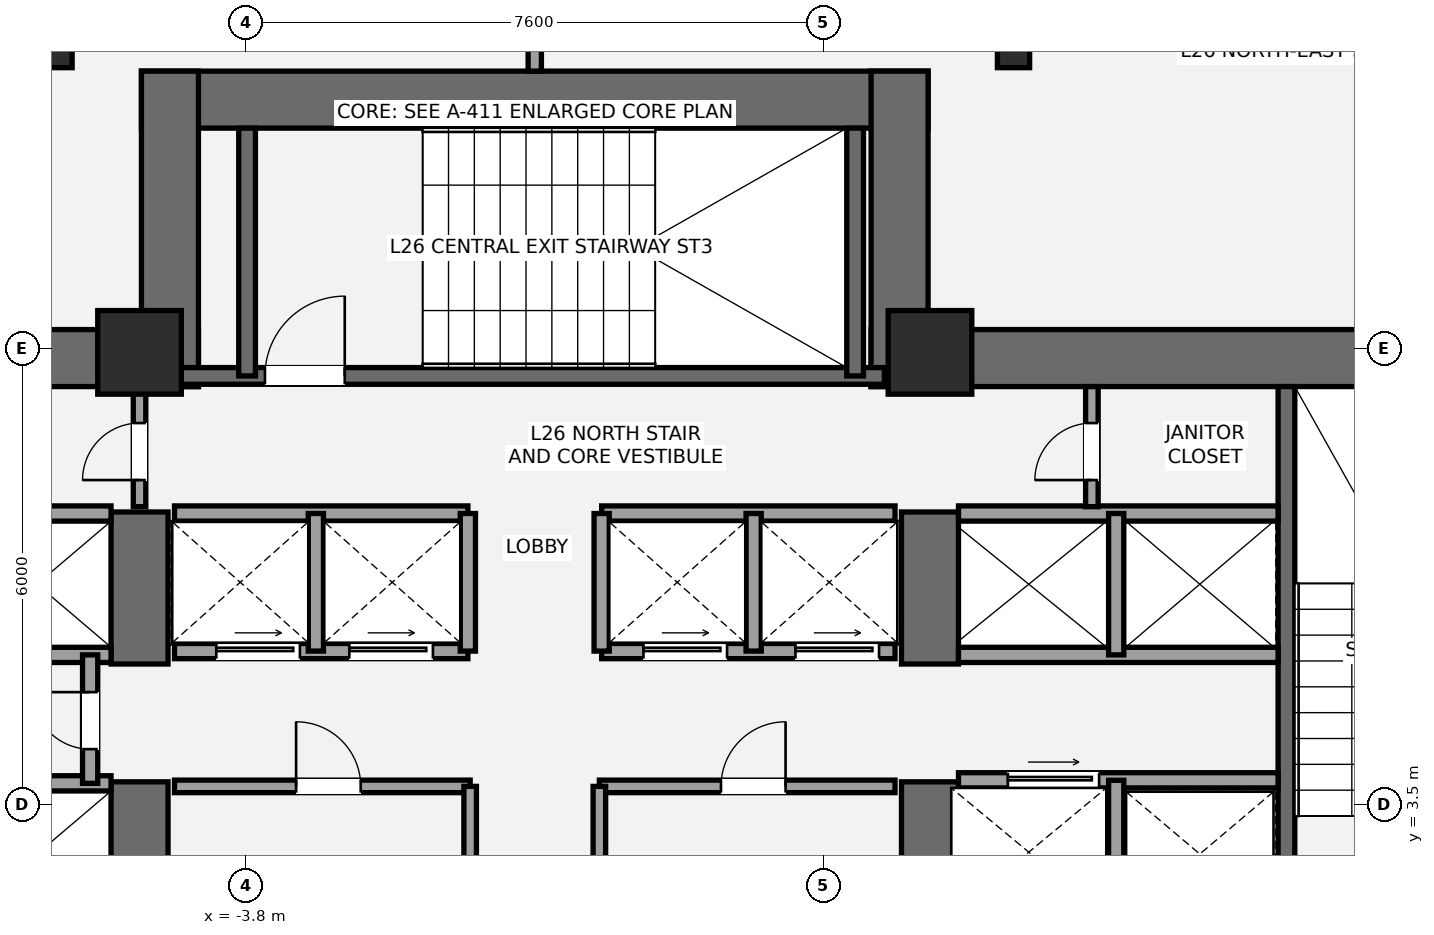
"""IFC4 building model, lengths in metres.
Left out: names, types, materials, properties, quantities, classifications, styles, units other than length and angle.
Written with IfcOpenShell. Run it as: python <this file> out.ifc"""

import sys

from ifc_helpers import new_model, si_unit, direction, frame, frame_2d, origin, origin_2d, place, context, subcontext, project, spatial, rectangle, i_section, extrude, element, fill, save


model = new_model("IFC4")
c1 = context("Model", 3, precision=1e-05, world=origin(), true_north=direction((0.0, 1.0)))
c2 = subcontext(c1, "Body", "Model", "MODEL_VIEW")
j1 = project(units=[si_unit("LENGTHUNIT", "METRE"), si_unit("PLANEANGLEUNIT", "RADIAN")], contexts=[c1])
p1 = place(None, origin())
s1 = spatial("IfcSite", under=j1, at=p1, CompositionType="ELEMENT")
p2 = place(p1, origin())
s2 = spatial("IfcBuilding", under=s1, at=p2, CompositionType="ELEMENT")
p3 = place(p2, frame((0.0, 0.0, 100.1)))
s3 = spatial("IfcBuildingStorey", under=s2, at=p3, CompositionType="ELEMENT", Elevation=100.1)
p4 = place(p3, frame((-13.9, 9.375, 0.0), z_axis=(0.0, 0.0, 1.0), x_axis=(1.0, 0.0, 0.0)))
e1 = element("IfcWall", 1, at=p4, inside=s3, PredefinedType="SHEAR", context=c2, shape_type="SweptSolid", body=[
    extrude(rectangle(XDim=9.475, YDim=0.75, at=frame_2d((4.737, 0.0))), origin(), (0.0, 0.0, 1.0), 3.5),
])
p5 = place(p3, frame((-5.2, 1.1, 0.0), z_axis=(0.0, 0.0, 1.0), x_axis=(0.0, 1.0, 0.0)))
e2 = element("IfcWall", 2, at=p5, inside=s3, PredefinedType="SHEAR", context=c2, shape_type="SweptSolid", body=[
    extrude(rectangle(XDim=2.7, YDim=0.75, at=frame_2d((1.35, 0.0))), origin(), (0.0, 0.0, 1.0), 3.5),
])
p6 = place(p3, frame((-5.2, 5.35, 0.0), z_axis=(0.0, 0.0, 1.0), x_axis=(0.0, 1.0, 0.0)))
e3 = element("IfcWall", 3, at=p6, inside=s3, PredefinedType="SHEAR", context=c2, shape_type="SweptSolid", body=[
    extrude(rectangle(XDim=2.0, YDim=0.75, at=frame_2d((1.0, 0.0))), origin(), (0.0, 0.0, 1.0), 3.5),
])
p7 = place(p3, frame((4.425, 9.375, 0.0), z_axis=(0.0, 0.0, 1.0), x_axis=(1.0, 0.0, 0.0)))
e4 = element("IfcWall", 4, at=p7, inside=s3, PredefinedType="SHEAR", context=c2, shape_type="SweptSolid", body=[
    extrude(rectangle(XDim=9.475, YDim=0.75, at=frame_2d((4.737, 0.0))), origin(), (0.0, 0.0, 1.0), 3.5),
])
p8 = place(p3, frame((5.2, 1.1, 0.0), z_axis=(0.0, 0.0, 1.0), x_axis=(0.0, 1.0, 0.0)))
e5 = element("IfcWall", 5, at=p8, inside=s3, PredefinedType="SHEAR", context=c2, shape_type="SweptSolid", body=[
    extrude(rectangle(XDim=2.7, YDim=0.75, at=frame_2d((1.35, 0.0))), origin(), (0.0, 0.0, 1.0), 3.5),
])
p9 = place(p3, frame((5.2, 5.35, 0.0), z_axis=(0.0, 0.0, 1.0), x_axis=(0.0, 1.0, 0.0)))
e6 = element("IfcWall", 6, at=p9, inside=s3, PredefinedType="SHEAR", context=c2, shape_type="SweptSolid", body=[
    extrude(rectangle(XDim=2.0, YDim=0.75, at=frame_2d((1.0, 0.0))), origin(), (0.0, 0.0, 1.0), 3.5),
])
p10 = place(p3, frame((9.89, 1.85, 0.0), z_axis=(0.0, 0.0, 1.0), x_axis=(0.0, 1.0, 0.0)))
e7 = element("IfcWall", 7, at=p10, inside=s3, PredefinedType="SHEAR", context=c2, shape_type="SweptSolid", body=[
    extrude(rectangle(XDim=7.15, YDim=0.22, at=frame_2d((3.575, 0.0))), origin(), (0.0, 0.0, 1.0), 3.5),
])
p11 = place(p3, frame((-5.175, 12.775, 0.0), z_axis=(0.0, 0.0, 1.0), x_axis=(1.0, 0.0, 0.0)))
e8 = element("IfcWall", 8, at=p11, inside=s3, PredefinedType="SHEAR", context=c2, shape_type="SweptSolid", body=[
    extrude(rectangle(XDim=10.35, YDim=0.75, at=frame_2d((5.175, 0.0))), origin(), (0.0, 0.0, 1.0), 3.5),
])
for number, where, z_axis, x_axis in (
    (9, (-4.8, 9.0, 0.0), (0.0, 0.0, 1.0), (0.0, 1.0, 0.0)),
    (10, (4.8, 9.0, 0.0), (0.0, 0.0, 1.0), (0.0, 1.0, 0.0)),
):
    element("IfcWall", number, at=place(p3, frame(where, z_axis=z_axis, x_axis=x_axis)), inside=s3, PredefinedType="SHEAR", context=c2, shape_type="SweptSolid", body=[
        extrude(rectangle(XDim=4.15, YDim=0.75, at=frame_2d((2.075, 0.0))), origin(), (0.0, 0.0, 1.0), 3.5),
    ])
p12 = place(p3, frame((-4.7, 9.14, 0.0), z_axis=(0.0, 0.0, 1.0), x_axis=(1.0, 0.0, 0.0)))
e11 = element("IfcWall", 11, at=p12, inside=s3, PredefinedType="SHEAR", context=c2, shape_type="SweptSolid", body=[
    extrude(rectangle(XDim=9.3, YDim=0.22, at=frame_2d((4.65, 0.0))), origin(), (0.0, 0.0, 1.0), 3.5),
])
p13 = place(p12, frame((1.15, 0.0, 0.0)))
e12 = element("IfcOpeningElement", 12, at=p13, cuts=e11, PredefinedType="OPENING", context=c2, shape_type="SweptSolid", body=[
    extrude(rectangle(XDim=1.05, YDim=2.15, at=frame_2d((0.525, 1.075))), frame((0.0, 0.12, 0.0), z_axis=(0.0, -1.0, 0.0), x_axis=(1.0, 0.0, 0.0)), (0.0, 0.0, 1.0), 0.24),
])
for number, where, z_axis, x_axis in (
    (13, (-3.785, 9.14, 0.0), (0.0, 0.0, 1.0), (0.0, 1.0, 0.0)),
    (14, (4.215, 9.14, 0.0), (0.0, 0.0, 1.0), (0.0, 1.0, 0.0)),
):
    element("IfcWall", number, at=place(p3, frame(where, z_axis=z_axis, x_axis=x_axis)), inside=s3, PredefinedType="SHEAR", context=c2, shape_type="SweptSolid", body=[
        extrude(rectangle(XDim=3.26, YDim=0.22, at=frame_2d((1.63, 0.0))), origin(), (0.0, 0.0, 1.0), 3.5),
    ])
for number, where, z_axis, x_axis in (
    (15, (-5.2, 9.45, 0.0), (0.0, 0.0, 1.0), (1.0, 0.0, 0.0)),
    (16, (5.2, 9.45, 0.0), (0.0, 0.0, 1.0), (1.0, 0.0, 0.0)),
):
    element("IfcColumn", number, at=place(p3, frame(where, z_axis=z_axis, x_axis=x_axis)), inside=s3, PredefinedType="COLUMN", context=c2, shape_type="SweptSolid", body=[
        extrude(rectangle(XDim=1.1, YDim=1.1, at=origin_2d()), origin(), (0.0, 0.0, 1.0), 3.5),
    ])
for number, where, z_axis, x_axis in (
    (17, (6.299, 13.433, 0.0), (0.0, 0.0, 1.0), (1.0, 0.0, 0.0)),
    (18, (-6.299, 13.433, 0.0), (0.0, 0.0, 1.0), (1.0, 0.0, 0.0)),
):
    element("IfcColumn", number, at=place(p3, frame(where, z_axis=z_axis, x_axis=x_axis)), inside=s3, PredefinedType="COLUMN", context=c2, shape_type="SweptSolid", body=[
        extrude(i_section(OverallWidth=0.424, OverallDepth=0.474, WebThickness=0.048, FlangeThickness=0.077, at=origin_2d()), origin(), (0.0, 0.0, 1.0), 3.5),
    ])
for number, where, z_axis, x_axis in (
    (19, (-9.78, 3.78, 0.0), (0.0, 0.0, 1.0), (1.0, 0.0, 0.0)),
    (20, (-9.78, 5.47, 0.0), (0.0, 0.0, 1.0), (1.0, 0.0, 0.0)),
    (21, (-9.78, 7.33, 0.0), (0.0, 0.0, 1.0), (1.0, 0.0, 0.0)),
):
    element("IfcWall", number, at=place(p3, frame(where, z_axis=z_axis, x_axis=x_axis)), inside=s3, PredefinedType="SOLIDWALL", context=c2, shape_type="SweptSolid", body=[
        extrude(rectangle(XDim=4.205, YDim=0.2, at=frame_2d((2.103, 0.0))), origin(), (0.0, 0.0, 1.0), 3.31),
    ])
p14 = place(p3, frame((-5.85, 3.78, 0.0), z_axis=(0.0, 0.0, 1.0), x_axis=(0.0, 1.0, 0.0)))
e22 = element("IfcWall", 22, at=p14, inside=s3, PredefinedType="SOLIDWALL", context=c2, shape_type="SweptSolid", body=[
    extrude(rectangle(XDim=1.69, YDim=0.2, at=frame_2d((0.845, 0.0))), origin(), (0.0, 0.0, 1.0), 3.31),
])
p15 = place(p14, frame((0.45, 0.0, 0.0)))
e23 = element("IfcOpeningElement", 23, at=p15, cuts=e22, PredefinedType="OPENING", context=c2, shape_type="SweptSolid", body=[
    extrude(rectangle(XDim=0.75, YDim=2.1, at=frame_2d((0.375, 1.05))), frame((0.0, 0.11, 0.0), z_axis=(0.0, -1.0, 0.0), x_axis=(1.0, 0.0, 0.0)), (0.0, 0.0, 1.0), 0.22),
])
p16 = place(p3, frame((5.575, 3.82, 0.0), z_axis=(0.0, 0.0, 1.0), x_axis=(1.0, 0.0, 0.0)))
e24 = element("IfcWall", 24, at=p16, inside=s3, PredefinedType="SOLIDWALL", context=c2, shape_type="SweptSolid", body=[
    extrude(rectangle(XDim=4.205, YDim=0.2, at=frame_2d((2.103, 0.0))), origin(), (0.0, 0.0, 1.0), 3.31),
])
p17 = place(p16, frame((0.65, 0.0, 0.0)))
e25 = element("IfcOpeningElement", 25, at=p17, cuts=e24, PredefinedType="OPENING", context=c2, shape_type="SweptSolid", body=[
    extrude(rectangle(XDim=1.2, YDim=2.2, at=frame_2d((0.6, 1.1))), frame((0.0, 0.11, 0.0), z_axis=(0.0, -1.0, 0.0), x_axis=(1.0, 0.0, 0.0)), (0.0, 0.0, 1.0), 0.22),
])
p18 = place(p3, frame((7.65, 1.85, 0.0), z_axis=(0.0, 0.0, 1.0), x_axis=(0.0, 1.0, 0.0)))
e26 = element("IfcWall", 26, at=p18, inside=s3, PredefinedType="SOLIDWALL", context=c2, shape_type="SweptSolid", body=[
    extrude(rectangle(XDim=1.97, YDim=0.2, at=frame_2d((0.985, 0.0))), origin(), (0.0, 0.0, 1.0), 3.31),
])
for number, where, z_axis, x_axis in (
    (27, (5.575, 5.47, 0.0), (0.0, 0.0, 1.0), (1.0, 0.0, 0.0)),
    (28, (5.575, 7.33, 0.0), (0.0, 0.0, 1.0), (1.0, 0.0, 0.0)),
):
    element("IfcWall", number, at=place(p3, frame(where, z_axis=z_axis, x_axis=x_axis)), inside=s3, PredefinedType="SOLIDWALL", context=c2, shape_type="SweptSolid", body=[
        extrude(rectangle(XDim=4.205, YDim=0.2, at=frame_2d((2.103, 0.0))), origin(), (0.0, 0.0, 1.0), 3.31),
    ])
p19 = place(p3, frame((7.65, 5.47, 0.0), z_axis=(0.0, 0.0, 1.0), x_axis=(0.0, 1.0, 0.0)))
e29 = element("IfcWall", 29, at=p19, inside=s3, PredefinedType="SOLIDWALL", context=c2, shape_type="SweptSolid", body=[
    extrude(rectangle(XDim=1.86, YDim=0.2, at=frame_2d((0.93, 0.0))), origin(), (0.0, 0.0, 1.0), 3.31),
])
p20 = place(p3, frame((-4.74, 3.74, 0.0), z_axis=(0.0, 0.0, 1.0), x_axis=(1.0, 0.0, 0.0)))
e30 = element("IfcWall", 30, at=p20, inside=s3, PredefinedType="PARTITIONING", context=c2, shape_type="SweptSolid", body=[
    extrude(rectangle(XDim=3.89, YDim=0.165, at=frame_2d((1.945, 0.0))), origin(), (0.0, 0.0, 1.0), 3.31),
])
p21 = place(p20, frame((1.6, 0.0, 0.0)))
e31 = element("IfcOpeningElement", 31, at=p21, cuts=e30, PredefinedType="OPENING", context=c2, shape_type="SweptSolid", body=[
    extrude(rectangle(XDim=0.85, YDim=2.1, at=frame_2d((0.425, 1.05))), frame((0.0, 0.093, 0.0), z_axis=(0.0, -1.0, 0.0), x_axis=(1.0, 0.0, 0.0)), (0.0, 0.0, 1.0), 0.185),
])
p22 = place(p3, frame((-0.85, 1.92, 0.0), z_axis=(0.0, 0.0, 1.0), x_axis=(0.0, 1.0, 0.0)))
e32 = element("IfcWall", 32, at=p22, inside=s3, PredefinedType="PARTITIONING", context=c2, shape_type="SweptSolid", body=[
    extrude(rectangle(XDim=1.82, YDim=0.165, at=frame_2d((0.91, 0.0))), origin(), (0.0, 0.0, 1.0), 3.31),
])
p23 = place(p3, frame((0.85, 3.74, 0.0), z_axis=(0.0, 0.0, 1.0), x_axis=(1.0, 0.0, 0.0)))
e33 = element("IfcWall", 33, at=p23, inside=s3, PredefinedType="PARTITIONING", context=c2, shape_type="SweptSolid", body=[
    extrude(rectangle(XDim=3.89, YDim=0.165, at=frame_2d((1.945, 0.0))), origin(), (0.0, 0.0, 1.0), 3.31),
])
p24 = place(p23, frame((1.6, 0.0, 0.0)))
e34 = element("IfcOpeningElement", 34, at=p24, cuts=e33, PredefinedType="OPENING", context=c2, shape_type="SweptSolid", body=[
    extrude(rectangle(XDim=0.85, YDim=2.1, at=frame_2d((0.425, 1.05))), frame((0.0, 0.093, 0.0), z_axis=(0.0, -1.0, 0.0), x_axis=(1.0, 0.0, 0.0)), (0.0, 0.0, 1.0), 0.185),
])
p25 = place(p3, frame((0.85, 1.92, 0.0), z_axis=(0.0, 0.0, 1.0), x_axis=(0.0, 1.0, 0.0)))
e35 = element("IfcWall", 35, at=p25, inside=s3, PredefinedType="PARTITIONING", context=c2, shape_type="SweptSolid", body=[
    extrude(rectangle(XDim=1.82, YDim=0.165, at=frame_2d((0.91, 0.0))), origin(), (0.0, 0.0, 1.0), 3.31),
])
p26 = place(p3, frame((-4.74, 5.52, 0.0), z_axis=(0.0, 0.0, 1.0), x_axis=(1.0, 0.0, 0.0)))
e36 = element("IfcWall", 36, at=p26, inside=s3, PredefinedType="SOLIDWALL", context=c2, shape_type="SweptSolid", body=[
    extrude(rectangle(XDim=3.86, YDim=0.2, at=frame_2d((1.93, 0.0))), origin(), (0.0, 0.0, 1.0), 3.31),
])
p27 = place(p26, frame((0.55, 0.0, 0.0)))
e37 = element("IfcOpeningElement", 37, at=p27, cuts=e36, PredefinedType="OPENING", context=c2, shape_type="SweptSolid", body=[
    extrude(rectangle(XDim=1.1, YDim=2.2, at=frame_2d((0.55, 1.1))), frame((0.0, 0.11, 0.0), z_axis=(0.0, -1.0, 0.0), x_axis=(1.0, 0.0, 0.0)), (0.0, 0.0, 1.0), 0.22),
])
p28 = place(p26, frame((2.3, 0.0, 0.0)))
e38 = element("IfcOpeningElement", 38, at=p28, cuts=e36, PredefinedType="OPENING", context=c2, shape_type="SweptSolid", body=[
    extrude(rectangle(XDim=1.1, YDim=2.2, at=frame_2d((0.55, 1.1))), frame((0.0, 0.11, 0.0), z_axis=(0.0, -1.0, 0.0), x_axis=(1.0, 0.0, 0.0)), (0.0, 0.0, 1.0), 0.22),
])
p29 = place(p3, frame((0.88, 5.52, 0.0), z_axis=(0.0, 0.0, 1.0), x_axis=(1.0, 0.0, 0.0)))
e39 = element("IfcWall", 39, at=p29, inside=s3, PredefinedType="SOLIDWALL", context=c2, shape_type="SweptSolid", body=[
    extrude(rectangle(XDim=3.86, YDim=0.2, at=frame_2d((1.93, 0.0))), origin(), (0.0, 0.0, 1.0), 3.31),
])
p30 = place(p29, frame((0.55, 0.0, 0.0)))
e40 = element("IfcOpeningElement", 40, at=p30, cuts=e39, PredefinedType="OPENING", context=c2, shape_type="SweptSolid", body=[
    extrude(rectangle(XDim=1.1, YDim=2.2, at=frame_2d((0.55, 1.1))), frame((0.0, 0.11, 0.0), z_axis=(0.0, -1.0, 0.0), x_axis=(1.0, 0.0, 0.0)), (0.0, 0.0, 1.0), 0.22),
])
p31 = place(p29, frame((2.55, 0.0, 0.0)))
e41 = element("IfcOpeningElement", 41, at=p31, cuts=e39, PredefinedType="OPENING", context=c2, shape_type="SweptSolid", body=[
    extrude(rectangle(XDim=1.1, YDim=2.2, at=frame_2d((0.55, 1.1))), frame((0.0, 0.11, 0.0), z_axis=(0.0, -1.0, 0.0), x_axis=(1.0, 0.0, 0.0)), (0.0, 0.0, 1.0), 0.22),
])
for number, where, z_axis, x_axis in (
    (42, (-4.74, 7.33, 0.0), (0.0, 0.0, 1.0), (1.0, 0.0, 0.0)),
    (43, (0.88, 7.33, 0.0), (0.0, 0.0, 1.0), (1.0, 0.0, 0.0)),
):
    element("IfcWall", number, at=place(p3, frame(where, z_axis=z_axis, x_axis=x_axis)), inside=s3, PredefinedType="SOLIDWALL", context=c2, shape_type="SweptSolid", body=[
        extrude(rectangle(XDim=3.86, YDim=0.2, at=frame_2d((1.93, 0.0))), origin(), (0.0, 0.0, 1.0), 3.31),
    ])
for number, where, z_axis, x_axis in (
    (44, (-2.88, 5.52, 0.0), (0.0, 0.0, 1.0), (0.0, 1.0, 0.0)),
    (45, (2.88, 5.52, 0.0), (0.0, 0.0, 1.0), (0.0, 1.0, 0.0)),
    (46, (-0.88, 5.52, 0.0), (0.0, 0.0, 1.0), (0.0, 1.0, 0.0)),
    (47, (0.88, 5.52, 0.0), (0.0, 0.0, 1.0), (0.0, 1.0, 0.0)),
):
    element("IfcWall", number, at=place(p3, frame(where, z_axis=z_axis, x_axis=x_axis)), inside=s3, PredefinedType="SOLIDWALL", context=c2, shape_type="SweptSolid", body=[
        extrude(rectangle(XDim=1.81, YDim=0.2, at=frame_2d((0.905, 0.0))), origin(), (0.0, 0.0, 1.0), 3.31),
    ])
p32 = place(p3, frame((-5.2, 7.42, 0.0), z_axis=(0.0, 0.0, 1.0), x_axis=(0.0, 1.0, 0.0)))
e48 = element("IfcWall", 48, at=p32, inside=s3, PredefinedType="PARTITIONING", context=c2, shape_type="SweptSolid", body=[
    extrude(rectangle(XDim=1.58, YDim=0.165, at=frame_2d((0.79, 0.0))), origin(), (0.0, 0.0, 1.0), 3.31),
])
p33 = place(p32, frame((0.35, 0.0, 0.0)))
e49 = element("IfcOpeningElement", 49, at=p33, cuts=e48, PredefinedType="OPENING", context=c2, shape_type="SweptSolid", body=[
    extrude(rectangle(XDim=0.75, YDim=2.1, at=frame_2d((0.375, 1.05))), frame((0.0, 0.093, 0.0), z_axis=(0.0, -1.0, 0.0), x_axis=(1.0, 0.0, 0.0)), (0.0, 0.0, 1.0), 0.185),
])
p34 = place(p3, frame((7.33, 7.42, 0.0), z_axis=(0.0, 0.0, 1.0), x_axis=(0.0, 1.0, 0.0)))
e50 = element("IfcWall", 50, at=p34, inside=s3, PredefinedType="PARTITIONING", context=c2, shape_type="SweptSolid", body=[
    extrude(rectangle(XDim=1.58, YDim=0.165, at=frame_2d((0.79, 0.0))), origin(), (0.0, 0.0, 1.0), 3.31),
])
p35 = place(p34, frame((0.35, 0.0, 0.0)))
e51 = element("IfcOpeningElement", 51, at=p35, cuts=e50, PredefinedType="OPENING", context=c2, shape_type="SweptSolid", body=[
    extrude(rectangle(XDim=0.75, YDim=2.1, at=frame_2d((0.375, 1.05))), frame((0.0, 0.093, 0.0), z_axis=(0.0, -1.0, 0.0), x_axis=(1.0, 0.0, 0.0)), (0.0, 0.0, 1.0), 0.185),
])
p36 = place(p3, frame((0.0, 13.15, 0.0), z_axis=(0.0, 0.0, 1.0), x_axis=(0.0, 1.0, 0.0)))
e52 = element("IfcWall", 52, at=p36, inside=s3, PredefinedType="PARTITIONING", context=c2, shape_type="SweptSolid", body=[
    extrude(rectangle(XDim=5.19, YDim=0.175, at=frame_2d((2.595, 0.0))), origin(), (0.0, 0.0, 1.0), 3.31),
])
p37 = place(p13, origin())
e53 = element("IfcDoor", 53, at=p37, inside=s3, OperationType="SINGLE_SWING_RIGHT", PredefinedType="DOOR", context=c2, shape_type="SweptSolid", body=[
    extrude(rectangle(XDim=1.05, YDim=2.15, at=frame_2d((0.525, 1.075))), frame((0.0, 0.025, 0.0), z_axis=(0.0, -1.0, 0.0), x_axis=(1.0, 0.0, 0.0)), (0.0, 0.0, 1.0), 0.05),
])
fill(e12, e53)
p38 = place(p15, origin())
e54 = element("IfcDoor", 54, at=p38, inside=s3, OperationType="SINGLE_SWING_RIGHT", PredefinedType="DOOR", context=c2, shape_type="SweptSolid", body=[
    extrude(rectangle(XDim=0.75, YDim=2.1, at=frame_2d((0.375, 1.05))), frame((0.0, 0.025, 0.0), z_axis=(0.0, -1.0, 0.0), x_axis=(1.0, 0.0, 0.0)), (0.0, 0.0, 1.0), 0.05),
])
fill(e23, e54)
p39 = place(p17, origin())
e55 = element("IfcDoor", 55, at=p39, inside=s3, OperationType="SLIDING_TO_RIGHT", PredefinedType="DOOR", context=c2, shape_type="SweptSolid", body=[
    extrude(rectangle(XDim=1.2, YDim=2.2, at=frame_2d((0.6, 1.1))), frame((0.0, 0.025, 0.0), z_axis=(0.0, -1.0, 0.0), x_axis=(1.0, 0.0, 0.0)), (0.0, 0.0, 1.0), 0.05),
])
fill(e25, e55)
p40 = place(p21, origin())
e56 = element("IfcDoor", 56, at=p40, inside=s3, OperationType="SINGLE_SWING_LEFT", PredefinedType="DOOR", context=c2, shape_type="SweptSolid", body=[
    extrude(rectangle(XDim=0.85, YDim=2.1, at=frame_2d((0.425, 1.05))), frame((0.0, 0.025, 0.0), z_axis=(0.0, -1.0, 0.0), x_axis=(1.0, 0.0, 0.0)), (0.0, 0.0, 1.0), 0.05),
])
fill(e31, e56)
p41 = place(p24, origin())
e57 = element("IfcDoor", 57, at=p41, inside=s3, OperationType="SINGLE_SWING_RIGHT", PredefinedType="DOOR", context=c2, shape_type="SweptSolid", body=[
    extrude(rectangle(XDim=0.85, YDim=2.1, at=frame_2d((0.425, 1.05))), frame((0.0, 0.025, 0.0), z_axis=(0.0, -1.0, 0.0), x_axis=(1.0, 0.0, 0.0)), (0.0, 0.0, 1.0), 0.05),
])
fill(e34, e57)
p42 = place(p27, origin())
e58 = element("IfcDoor", 58, at=p42, inside=s3, OperationType="SLIDING_TO_LEFT", PredefinedType="DOOR", context=c2, shape_type="SweptSolid", body=[
    extrude(rectangle(XDim=1.1, YDim=2.2, at=frame_2d((0.55, 1.1))), frame((0.0, 0.025, 0.0), z_axis=(0.0, -1.0, 0.0), x_axis=(1.0, 0.0, 0.0)), (0.0, 0.0, 1.0), 0.05),
])
fill(e37, e58)
p43 = place(p28, origin())
e59 = element("IfcDoor", 59, at=p43, inside=s3, OperationType="SLIDING_TO_LEFT", PredefinedType="DOOR", context=c2, shape_type="SweptSolid", body=[
    extrude(rectangle(XDim=1.1, YDim=2.2, at=frame_2d((0.55, 1.1))), frame((0.0, 0.025, 0.0), z_axis=(0.0, -1.0, 0.0), x_axis=(1.0, 0.0, 0.0)), (0.0, 0.0, 1.0), 0.05),
])
fill(e38, e59)
p44 = place(p30, origin())
e60 = element("IfcDoor", 60, at=p44, inside=s3, OperationType="SLIDING_TO_LEFT", PredefinedType="DOOR", context=c2, shape_type="SweptSolid", body=[
    extrude(rectangle(XDim=1.1, YDim=2.2, at=frame_2d((0.55, 1.1))), frame((0.0, 0.025, 0.0), z_axis=(0.0, -1.0, 0.0), x_axis=(1.0, 0.0, 0.0)), (0.0, 0.0, 1.0), 0.05),
])
fill(e40, e60)
p45 = place(p31, origin())
e61 = element("IfcDoor", 61, at=p45, inside=s3, OperationType="SLIDING_TO_LEFT", PredefinedType="DOOR", context=c2, shape_type="SweptSolid", body=[
    extrude(rectangle(XDim=1.1, YDim=2.2, at=frame_2d((0.55, 1.1))), frame((0.0, 0.025, 0.0), z_axis=(0.0, -1.0, 0.0), x_axis=(1.0, 0.0, 0.0)), (0.0, 0.0, 1.0), 0.05),
])
fill(e41, e61)
p46 = place(p33, origin())
e62 = element("IfcDoor", 62, at=p46, inside=s3, OperationType="SINGLE_SWING_LEFT", PredefinedType="DOOR", context=c2, shape_type="SweptSolid", body=[
    extrude(rectangle(XDim=0.75, YDim=2.1, at=frame_2d((0.375, 1.05))), frame((0.0, 0.025, 0.0), z_axis=(0.0, -1.0, 0.0), x_axis=(1.0, 0.0, 0.0)), (0.0, 0.0, 1.0), 0.05),
])
fill(e49, e62)
p47 = place(p35, origin())
e63 = element("IfcDoor", 63, at=p47, inside=s3, OperationType="SINGLE_SWING_LEFT", PredefinedType="DOOR", context=c2, shape_type="SweptSolid", body=[
    extrude(rectangle(XDim=0.75, YDim=2.1, at=frame_2d((0.375, 1.05))), frame((0.0, 0.025, 0.0), z_axis=(0.0, -1.0, 0.0), x_axis=(1.0, 0.0, 0.0)), (0.0, 0.0, 1.0), 0.05),
])
fill(e51, e63)
save(model, sys.argv[1])
